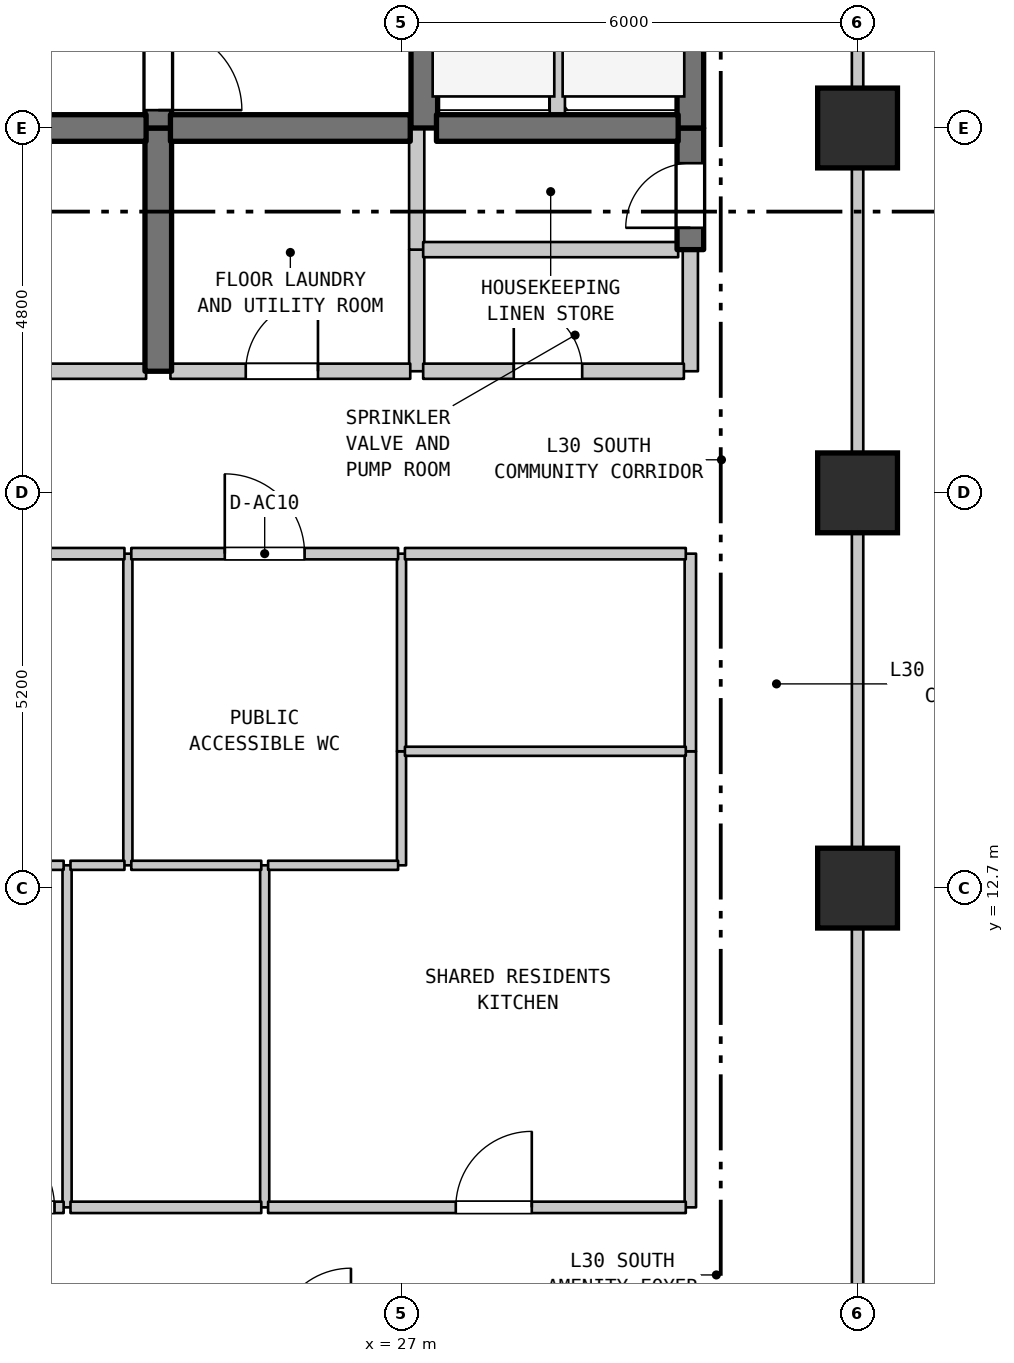
"""IFC4 building model, lengths in metres.
Left out: names, types, materials, properties, quantities, classifications, styles, units other than length and angle.
Written with IfcOpenShell. Run it as: python <this file> out.ifc"""

import sys

from ifc_helpers import new_model, si_unit, direction, frame, frame_2d, origin, origin_2d, place, context, subcontext, project, spatial, rectangle, extrude, element, fill, save


model = new_model("IFC4")
c1 = context("Model", 3, precision=1e-05, world=origin(), true_north=direction((0.0, 1.0)))
c2 = subcontext(c1, "Body", "Model", "MODEL_VIEW")
j1 = project(units=[si_unit("LENGTHUNIT", "METRE"), si_unit("PLANEANGLEUNIT", "RADIAN")], contexts=[c1])
p1 = place(None, origin())
s1 = spatial("IfcSite", under=j1, at=p1, CompositionType="ELEMENT")
p2 = place(p1, origin())
s2 = spatial("IfcBuilding", under=s1, at=p2, CompositionType="ELEMENT")
p3 = place(p2, frame((0.0, 0.0, 125.3)))
s3 = spatial("IfcBuildingStorey", under=s2, at=p3, CompositionType="ELEMENT", Elevation=125.3)
for number, where, z_axis, x_axis in (
    (1, (33.0, 12.7, 0.0), (0.0, 0.0, 1.0), (1.0, 0.0, 0.0)),
    (2, (33.0, 17.9, 0.0), (0.0, 0.0, 1.0), (1.0, 0.0, 0.0)),
    (3, (33.0, 22.7, 0.0), (0.0, 0.0, 1.0), (1.0, 0.0, 0.0)),
):
    element("IfcColumn", number, at=place(p3, frame(where, z_axis=z_axis, x_axis=x_axis)), inside=s3, PredefinedType="COLUMN", context=c2, shape_type="SweptSolid", body=[
        extrude(rectangle(XDim=1.05, YDim=1.05, at=origin_2d()), origin(), (0.0, 0.0, 1.0), 4.5),
    ])
p4 = place(p3, frame((22.6, 8.5, 0.0), z_axis=(0.0, 0.0, 1.0), x_axis=(0.0, 1.0, 0.0)))
e4 = element("IfcWall", 4, at=p4, inside=s3, PredefinedType="PARTITIONING", context=c2, shape_type="SweptSolid", body=[
    extrude(rectangle(XDim=4.5, YDim=0.12, at=frame_2d((2.25, 0.0))), origin(), (0.0, 0.0, 1.0), 4.185),
])
p5 = place(p3, frame((23.4, 13.0, 0.0), z_axis=(0.0, 0.0, 1.0), x_axis=(0.0, 1.0, 0.0)))
e5 = element("IfcWall", 5, at=p5, inside=s3, PredefinedType="PARTITIONING", context=c2, shape_type="SweptSolid", body=[
    extrude(rectangle(XDim=4.1, YDim=0.12, at=frame_2d((2.05, 0.0))), origin(), (0.0, 0.0, 1.0), 4.185),
])
p6 = place(p3, frame((23.8, 19.5, 0.0), z_axis=(0.0, 0.0, 1.0), x_axis=(0.0, 1.0, 0.0)))
e6 = element("IfcWall", 6, at=p6, inside=s3, PredefinedType="SHEAR", context=c2, shape_type="SweptSolid", body=[
    extrude(rectangle(XDim=3.2, YDim=0.35, at=frame_2d((1.6, 0.0))), origin(), (0.0, 0.0, 1.0), 4.185),
])
p7 = place(p3, frame((23.8, 22.7, 0.0), z_axis=(0.0, 0.0, 1.0), x_axis=(0.0, 1.0, 0.0)))
e7 = element("IfcWall", 7, at=p7, inside=s3, PredefinedType="SHEAR", context=c2, shape_type="SweptSolid", body=[
    extrude(rectangle(XDim=5.5, YDim=0.35, at=frame_2d((2.75, 0.0))), origin(), (0.0, 0.0, 1.0), 4.185),
])
p8 = place(p7, frame((0.235, 0.0, 0.0)))
e8 = element("IfcOpeningElement", 8, at=p8, cuts=e7, PredefinedType="OPENING", context=c2, shape_type="SweptSolid", body=[
    extrude(rectangle(XDim=1.1, YDim=2.15, at=frame_2d((0.55, 1.075))), frame((0.0, 0.185, 0.0), z_axis=(0.0, -1.0, 0.0), x_axis=(1.0, 0.0, 0.0)), (0.0, 0.0, 1.0), 0.37),
])
p9 = place(p3, frame((25.2, 8.5, 0.0), z_axis=(0.0, 0.0, 1.0), x_axis=(0.0, 1.0, 0.0)))
e9 = element("IfcWall", 9, at=p9, inside=s3, PredefinedType="PARTITIONING", context=c2, shape_type="SweptSolid", body=[
    extrude(rectangle(XDim=4.5, YDim=0.12, at=frame_2d((2.25, 0.0))), origin(), (0.0, 0.0, 1.0), 4.185),
])
p10 = place(p3, frame((27.0, 13.0, 0.0), z_axis=(0.0, 0.0, 1.0), x_axis=(0.0, 1.0, 0.0)))
e10 = element("IfcWall", 10, at=p10, inside=s3, PredefinedType="PARTITIONING", context=c2, shape_type="SweptSolid", body=[
    extrude(rectangle(XDim=1.5, YDim=0.12, at=frame_2d((0.75, 0.0))), origin(), (0.0, 0.0, 1.0), 4.185),
])
p11 = place(p3, frame((27.0, 14.5, 0.0), z_axis=(0.0, 0.0, 1.0), x_axis=(0.0, 1.0, 0.0)))
e11 = element("IfcWall", 11, at=p11, inside=s3, PredefinedType="PARTITIONING", context=c2, shape_type="SweptSolid", body=[
    extrude(rectangle(XDim=2.6, YDim=0.12, at=frame_2d((1.3, 0.0))), origin(), (0.0, 0.0, 1.0), 4.185),
])
p12 = place(p3, frame((27.2, 19.5, 0.0), z_axis=(0.0, 0.0, 1.0), x_axis=(0.0, 1.0, 0.0)))
e12 = element("IfcWall", 12, at=p12, inside=s3, PredefinedType="STANDARD", context=c2, shape_type="SweptSolid", body=[
    extrude(rectangle(XDim=1.6, YDim=0.2, at=frame_2d((0.8, 0.0))), origin(), (0.0, 0.0, 1.0), 4.185),
])
p13 = place(p3, frame((27.2, 21.1, 0.0), z_axis=(0.0, 0.0, 1.0), x_axis=(0.0, 1.0, 0.0)))
e13 = element("IfcWall", 13, at=p13, inside=s3, PredefinedType="STANDARD", context=c2, shape_type="SweptSolid", body=[
    extrude(rectangle(XDim=1.6, YDim=0.2, at=frame_2d((0.8, 0.0))), origin(), (0.0, 0.0, 1.0), 4.185),
])
p14 = place(p3, frame((27.3, 22.7, 0.0), z_axis=(0.0, 0.0, 1.0), x_axis=(0.0, 1.0, 0.0)))
e14 = element("IfcWall", 14, at=p14, inside=s3, PredefinedType="SHEAR", context=c2, shape_type="SweptSolid", body=[
    extrude(rectangle(XDim=2.9, YDim=0.35, at=frame_2d((1.45, 0.0))), origin(), (0.0, 0.0, 1.0), 4.185),
])
p15 = place(p3, frame((29.05, 22.7, 0.0), z_axis=(0.0, 0.0, 1.0), x_axis=(0.0, 1.0, 0.0)))
e15 = element("IfcWall", 15, at=p15, inside=s3, PredefinedType="STANDARD", context=c2, shape_type="SweptSolid", body=[
    extrude(rectangle(XDim=2.9, YDim=0.2, at=frame_2d((1.45, 0.0))), origin(), (0.0, 0.0, 1.0), 4.185),
])
p16 = place(p3, frame((30.8, 8.5, 0.0), z_axis=(0.0, 0.0, 1.0), x_axis=(0.0, 1.0, 0.0)))
e16 = element("IfcWall", 16, at=p16, inside=s3, PredefinedType="STANDARD", context=c2, shape_type="SweptSolid", body=[
    extrude(rectangle(XDim=6.0, YDim=0.15, at=frame_2d((3.0, 0.0))), origin(), (0.0, 0.0, 1.0), 4.185),
])
p17 = place(p3, frame((30.8, 14.5, 0.0), z_axis=(0.0, 0.0, 1.0), x_axis=(0.0, 1.0, 0.0)))
e17 = element("IfcWall", 17, at=p17, inside=s3, PredefinedType="STANDARD", context=c2, shape_type="SweptSolid", body=[
    extrude(rectangle(XDim=2.6, YDim=0.15, at=frame_2d((1.3, 0.0))), origin(), (0.0, 0.0, 1.0), 4.185),
])
p18 = place(p3, frame((30.8, 19.5, 0.0), z_axis=(0.0, 0.0, 1.0), x_axis=(0.0, 1.0, 0.0)))
e18 = element("IfcWall", 18, at=p18, inside=s3, PredefinedType="STANDARD", context=c2, shape_type="SweptSolid", body=[
    extrude(rectangle(XDim=1.6, YDim=0.2, at=frame_2d((0.8, 0.0))), origin(), (0.0, 0.0, 1.0), 4.185),
])
p19 = place(p3, frame((30.8, 21.1, 0.0), z_axis=(0.0, 0.0, 1.0), x_axis=(0.0, 1.0, 0.0)))
e19 = element("IfcWall", 19, at=p19, inside=s3, PredefinedType="SHEAR", context=c2, shape_type="SweptSolid", body=[
    extrude(rectangle(XDim=1.6, YDim=0.35, at=frame_2d((0.8, 0.0))), origin(), (0.0, 0.0, 1.0), 4.185),
])
p20 = place(p19, frame((0.287, 0.0, 0.0)))
e20 = element("IfcOpeningElement", 20, at=p20, cuts=e19, PredefinedType="OPENING", context=c2, shape_type="SweptSolid", body=[
    extrude(rectangle(XDim=0.85, YDim=2.1, at=frame_2d((0.425, 1.05))), frame((0.0, 0.185, 0.0), z_axis=(0.0, -1.0, 0.0), x_axis=(1.0, 0.0, 0.0)), (0.0, 0.0, 1.0), 0.37),
])
p21 = place(p3, frame((30.8, 22.7, 0.0), z_axis=(0.0, 0.0, 1.0), x_axis=(0.0, 1.0, 0.0)))
e21 = element("IfcWall", 21, at=p21, inside=s3, PredefinedType="SHEAR", context=c2, shape_type="SweptSolid", body=[
    extrude(rectangle(XDim=2.9, YDim=0.35, at=frame_2d((1.45, 0.0))), origin(), (0.0, 0.0, 1.0), 4.185),
])
p22 = place(p3, frame((33.0, 6.7, 0.0), z_axis=(0.0, 0.0, 1.0), x_axis=(0.0, 1.0, 0.0)))
e22 = element("IfcWall", 22, at=p22, inside=s3, PredefinedType="STANDARD", context=c2, shape_type="SweptSolid", body=[
    extrude(rectangle(XDim=19.2, YDim=0.15, at=frame_2d((9.6, 0.0))), origin(), (0.0, 0.0, 1.0), 3.735),
])
p23 = place(p3, frame((18.985, 8.5, 0.0), z_axis=(0.0, 0.0, 1.0), x_axis=(1.0, 0.0, 0.0)))
e23 = element("IfcWall", 23, at=p23, inside=s3, PredefinedType="STANDARD", context=c2, shape_type="SweptSolid", body=[
    extrude(rectangle(XDim=3.57, YDim=0.15, at=frame_2d((1.785, 0.0))), origin(), (0.0, 0.0, 1.0), 4.185),
])
p24 = place(p23, frame((2.45, 0.0, 0.0)))
e24 = element("IfcOpeningElement", 24, at=p24, cuts=e23, PredefinedType="OPENING", context=c2, shape_type="SweptSolid", body=[
    extrude(rectangle(XDim=1.0, YDim=2.15, at=frame_2d((0.5, 1.075))), frame((0.0, 0.085, 0.0), z_axis=(0.0, -1.0, 0.0), x_axis=(1.0, 0.0, 0.0)), (0.0, 0.0, 1.0), 0.17),
])
p25 = place(p3, frame((22.645, 8.5, 0.0), z_axis=(0.0, 0.0, 1.0), x_axis=(1.0, 0.0, 0.0)))
e25 = element("IfcWall", 25, at=p25, inside=s3, PredefinedType="STANDARD", context=c2, shape_type="SweptSolid", body=[
    extrude(rectangle(XDim=2.51, YDim=0.15, at=frame_2d((1.255, 0.0))), origin(), (0.0, 0.0, 1.0), 4.185),
])
p26 = place(p3, frame((25.245, 8.5, 0.0), z_axis=(0.0, 0.0, 1.0), x_axis=(1.0, 0.0, 0.0)))
e26 = element("IfcWall", 26, at=p26, inside=s3, PredefinedType="STANDARD", context=c2, shape_type="SweptSolid", body=[
    extrude(rectangle(XDim=5.495, YDim=0.15, at=frame_2d((2.748, 0.0))), origin(), (0.0, 0.0, 1.0), 4.185),
])
p27 = place(p26, frame((2.469, 0.0, 0.0)))
e27 = element("IfcOpeningElement", 27, at=p27, cuts=e26, PredefinedType="OPENING", context=c2, shape_type="SweptSolid", body=[
    extrude(rectangle(XDim=1.0, YDim=2.15, at=frame_2d((0.5, 1.075))), frame((0.0, 0.085, 0.0), z_axis=(0.0, -1.0, 0.0), x_axis=(1.0, 0.0, 0.0)), (0.0, 0.0, 1.0), 0.17),
])
p28 = place(p3, frame((15.06, 13.0, 0.0), z_axis=(0.0, 0.0, 1.0), x_axis=(1.0, 0.0, 0.0)))
e28 = element("IfcWall", 28, at=p28, inside=s3, PredefinedType="PARTITIONING", context=c2, shape_type="SweptSolid", body=[
    extrude(rectangle(XDim=7.495, YDim=0.12, at=frame_2d((3.748, 0.0))), origin(), (0.0, 0.0, 1.0), 4.185),
])
p29 = place(p3, frame((22.645, 13.0, 0.0), z_axis=(0.0, 0.0, 1.0), x_axis=(1.0, 0.0, 0.0)))
e29 = element("IfcWall", 29, at=p29, inside=s3, PredefinedType="PARTITIONING", context=c2, shape_type="SweptSolid", body=[
    extrude(rectangle(XDim=0.71, YDim=0.12, at=frame_2d((0.355, 0.0))), origin(), (0.0, 0.0, 1.0), 4.185),
])
for number, where, z_axis, x_axis in (
    (30, (23.445, 13.0, 0.0), (0.0, 0.0, 1.0), (1.0, 0.0, 0.0)),
    (31, (25.245, 13.0, 0.0), (0.0, 0.0, 1.0), (1.0, 0.0, 0.0)),
):
    element("IfcWall", number, at=place(p3, frame(where, z_axis=z_axis, x_axis=x_axis)), inside=s3, PredefinedType="PARTITIONING", context=c2, shape_type="SweptSolid", body=[
        extrude(rectangle(XDim=1.71, YDim=0.12, at=frame_2d((0.855, 0.0))), origin(), (0.0, 0.0, 1.0), 4.185),
    ])
p30 = place(p3, frame((27.045, 14.5, 0.0), z_axis=(0.0, 0.0, 1.0), x_axis=(1.0, 0.0, 0.0)))
e32 = element("IfcWall", 32, at=p30, inside=s3, PredefinedType="PARTITIONING", context=c2, shape_type="SweptSolid", body=[
    extrude(rectangle(XDim=3.695, YDim=0.12, at=frame_2d((1.848, 0.0))), origin(), (0.0, 0.0, 1.0), 4.185),
])
p31 = place(p3, frame((15.06, 17.1, 0.0), z_axis=(0.0, 0.0, 1.0), x_axis=(1.0, 0.0, 0.0)))
e33 = element("IfcWall", 33, at=p31, inside=s3, PredefinedType="STANDARD", context=c2, shape_type="SweptSolid", body=[
    extrude(rectangle(XDim=8.295, YDim=0.15, at=frame_2d((4.147, 0.0))), origin(), (0.0, 0.0, 1.0), 4.185),
])
p32 = place(p31, frame((1.595, 0.0, 0.0)))
e34 = element("IfcOpeningElement", 34, at=p32, cuts=e33, PredefinedType="OPENING", context=c2, shape_type="SweptSolid", body=[
    extrude(rectangle(XDim=0.9, YDim=2.1, at=frame_2d((0.45, 1.05))), frame((0.0, 0.085, 0.0), z_axis=(0.0, -1.0, 0.0), x_axis=(1.0, 0.0, 0.0)), (0.0, 0.0, 1.0), 0.17),
])
p33 = place(p31, frame((5.645, 0.0, 0.0)))
e35 = element("IfcOpeningElement", 35, at=p33, cuts=e33, PredefinedType="OPENING", context=c2, shape_type="SweptSolid", body=[
    extrude(rectangle(XDim=0.9, YDim=2.1, at=frame_2d((0.45, 1.05))), frame((0.0, 0.085, 0.0), z_axis=(0.0, -1.0, 0.0), x_axis=(1.0, 0.0, 0.0)), (0.0, 0.0, 1.0), 0.17),
])
p34 = place(p3, frame((23.445, 17.1, 0.0), z_axis=(0.0, 0.0, 1.0), x_axis=(1.0, 0.0, 0.0)))
e36 = element("IfcWall", 36, at=p34, inside=s3, PredefinedType="STANDARD", context=c2, shape_type="SweptSolid", body=[
    extrude(rectangle(XDim=3.51, YDim=0.15, at=frame_2d((1.755, 0.0))), origin(), (0.0, 0.0, 1.0), 4.185),
])
p35 = place(p34, frame((1.23, 0.0, 0.0)))
e37 = element("IfcOpeningElement", 37, at=p35, cuts=e36, PredefinedType="OPENING", context=c2, shape_type="SweptSolid", body=[
    extrude(rectangle(XDim=1.05, YDim=2.15, at=frame_2d((0.525, 1.075))), frame((0.0, 0.085, 0.0), z_axis=(0.0, -1.0, 0.0), x_axis=(1.0, 0.0, 0.0)), (0.0, 0.0, 1.0), 0.17),
])
p36 = place(p3, frame((27.045, 17.1, 0.0), z_axis=(0.0, 0.0, 1.0), x_axis=(1.0, 0.0, 0.0)))
e38 = element("IfcWall", 38, at=p36, inside=s3, PredefinedType="STANDARD", context=c2, shape_type="SweptSolid", body=[
    extrude(rectangle(XDim=3.695, YDim=0.15, at=frame_2d((1.848, 0.0))), origin(), (0.0, 0.0, 1.0), 4.185),
])
p37 = place(p3, frame((19.16, 19.5, 0.0), z_axis=(0.0, 0.0, 1.0), x_axis=(1.0, 0.0, 0.0)))
e39 = element("IfcWall", 39, at=p37, inside=s3, PredefinedType="STANDARD", context=c2, shape_type="SweptSolid", body=[
    extrude(rectangle(XDim=4.48, YDim=0.2, at=frame_2d((2.24, 0.0))), origin(), (0.0, 0.0, 1.0), 4.185),
])
p38 = place(p37, frame((1.64, 0.0, 0.0)))
e40 = element("IfcOpeningElement", 40, at=p38, cuts=e39, PredefinedType="OPENING", context=c2, shape_type="SweptSolid", body=[
    extrude(rectangle(XDim=1.2, YDim=2.2, at=frame_2d((0.6, 1.1))), frame((0.0, 0.11, 0.0), z_axis=(0.0, -1.0, 0.0), x_axis=(1.0, 0.0, 0.0)), (0.0, 0.0, 1.0), 0.22),
])
p39 = place(p3, frame((23.96, 19.5, 0.0), z_axis=(0.0, 0.0, 1.0), x_axis=(1.0, 0.0, 0.0)))
e41 = element("IfcWall", 41, at=p39, inside=s3, PredefinedType="STANDARD", context=c2, shape_type="SweptSolid", body=[
    extrude(rectangle(XDim=3.155, YDim=0.2, at=frame_2d((1.578, 0.0))), origin(), (0.0, 0.0, 1.0), 4.185),
])
p40 = place(p39, frame((0.991, 0.0, 0.0)))
e42 = element("IfcOpeningElement", 42, at=p40, cuts=e41, PredefinedType="OPENING", context=c2, shape_type="SweptSolid", body=[
    extrude(rectangle(XDim=0.95, YDim=2.15, at=frame_2d((0.475, 1.075))), frame((0.0, 0.11, 0.0), z_axis=(0.0, -1.0, 0.0), x_axis=(1.0, 0.0, 0.0)), (0.0, 0.0, 1.0), 0.22),
])
p41 = place(p3, frame((27.285, 19.5, 0.0), z_axis=(0.0, 0.0, 1.0), x_axis=(1.0, 0.0, 0.0)))
e43 = element("IfcWall", 43, at=p41, inside=s3, PredefinedType="STANDARD", context=c2, shape_type="SweptSolid", body=[
    extrude(rectangle(XDim=3.43, YDim=0.2, at=frame_2d((1.715, 0.0))), origin(), (0.0, 0.0, 1.0), 4.185),
])
p42 = place(p41, frame((1.192, 0.0, 0.0)))
e44 = element("IfcOpeningElement", 44, at=p42, cuts=e43, PredefinedType="OPENING", context=c2, shape_type="SweptSolid", body=[
    extrude(rectangle(XDim=0.9, YDim=2.15, at=frame_2d((0.45, 1.075))), frame((0.0, 0.11, 0.0), z_axis=(0.0, -1.0, 0.0), x_axis=(1.0, 0.0, 0.0)), (0.0, 0.0, 1.0), 0.22),
])
p43 = place(p3, frame((27.285, 21.1, 0.0), z_axis=(0.0, 0.0, 1.0), x_axis=(1.0, 0.0, 0.0)))
e45 = element("IfcWall", 45, at=p43, inside=s3, PredefinedType="STANDARD", context=c2, shape_type="SweptSolid", body=[
    extrude(rectangle(XDim=3.355, YDim=0.2, at=frame_2d((1.677, 0.0))), origin(), (0.0, 0.0, 1.0), 4.185),
])
p44 = place(p3, frame((19.16, 22.7, 0.0), z_axis=(0.0, 0.0, 1.0), x_axis=(1.0, 0.0, 0.0)))
e46 = element("IfcWall", 46, at=p44, inside=s3, PredefinedType="SHEAR", context=c2, shape_type="SweptSolid", body=[
    extrude(rectangle(XDim=4.48, YDim=0.35, at=frame_2d((2.24, 0.0))), origin(), (0.0, 0.0, 1.0), 4.185),
])
p45 = place(p44, frame((1.64, 0.0, 0.0)))
e47 = element("IfcOpeningElement", 47, at=p45, cuts=e46, PredefinedType="OPENING", context=c2, shape_type="SweptSolid", body=[
    extrude(rectangle(XDim=1.2, YDim=2.2, at=frame_2d((0.6, 1.1))), frame((0.0, 0.185, 0.0), z_axis=(0.0, -1.0, 0.0), x_axis=(1.0, 0.0, 0.0)), (0.0, 0.0, 1.0), 0.37),
])
p46 = place(p3, frame((23.96, 22.7, 0.0), z_axis=(0.0, 0.0, 1.0), x_axis=(1.0, 0.0, 0.0)))
e48 = element("IfcWall", 48, at=p46, inside=s3, PredefinedType="SHEAR", context=c2, shape_type="SweptSolid", body=[
    extrude(rectangle(XDim=3.155, YDim=0.35, at=frame_2d((1.578, 0.0))), origin(), (0.0, 0.0, 1.0), 4.185),
])
p47 = place(p3, frame((27.46, 22.7, 0.0), z_axis=(0.0, 0.0, 1.0), x_axis=(1.0, 0.0, 0.0)))
e49 = element("IfcWall", 49, at=p47, inside=s3, PredefinedType="SHEAR", context=c2, shape_type="SweptSolid", body=[
    extrude(rectangle(XDim=3.18, YDim=0.35, at=frame_2d((1.59, 0.0))), origin(), (0.0, 0.0, 1.0), 4.185),
])
p48 = place(p8, frame((1.1, 0.0, 0.0), z_axis=(0.0, 0.0, 1.0), x_axis=(-1.0, 0.0, 0.0)))
e50 = element("IfcDoor", 50, at=p48, inside=s3, OperationType="SINGLE_SWING_LEFT", PredefinedType="DOOR", context=c2, shape_type="SweptSolid", body=[
    extrude(rectangle(XDim=1.1, YDim=2.15, at=frame_2d((0.55, 1.075))), frame((0.0, 0.025, 0.0), z_axis=(0.0, -1.0, 0.0), x_axis=(1.0, 0.0, 0.0)), (0.0, 0.0, 1.0), 0.05),
])
fill(e8, e50)
p49 = place(p20, origin())
e51 = element("IfcDoor", 51, at=p49, inside=s3, OperationType="SINGLE_SWING_LEFT", PredefinedType="DOOR", context=c2, shape_type="SweptSolid", body=[
    extrude(rectangle(XDim=0.85, YDim=2.1, at=frame_2d((0.425, 1.05))), frame((0.0, 0.025, 0.0), z_axis=(0.0, -1.0, 0.0), x_axis=(1.0, 0.0, 0.0)), (0.0, 0.0, 1.0), 0.05),
])
fill(e20, e51)
p50 = place(p24, origin())
e52 = element("IfcDoor", 52, at=p50, inside=s3, OperationType="SINGLE_SWING_LEFT", PredefinedType="DOOR", context=c2, shape_type="SweptSolid", body=[
    extrude(rectangle(XDim=1.0, YDim=2.15, at=frame_2d((0.5, 1.075))), frame((0.0, 0.025, 0.0), z_axis=(0.0, -1.0, 0.0), x_axis=(1.0, 0.0, 0.0)), (0.0, 0.0, 1.0), 0.05),
])
fill(e24, e52)
p51 = place(p27, origin())
e53 = element("IfcDoor", 53, at=p51, inside=s3, OperationType="SINGLE_SWING_RIGHT", PredefinedType="DOOR", context=c2, shape_type="SweptSolid", body=[
    extrude(rectangle(XDim=1.0, YDim=2.15, at=frame_2d((0.5, 1.075))), frame((0.0, 0.025, 0.0), z_axis=(0.0, -1.0, 0.0), x_axis=(1.0, 0.0, 0.0)), (0.0, 0.0, 1.0), 0.05),
])
fill(e27, e53)
p52 = place(p35, origin())
e54 = element("IfcDoor", 54, at=p52, inside=s3, OperationType="SINGLE_SWING_LEFT", PredefinedType="DOOR", context=c2, shape_type="SweptSolid", body=[
    extrude(rectangle(XDim=1.05, YDim=2.15, at=frame_2d((0.525, 1.075))), frame((0.0, 0.025, 0.0), z_axis=(0.0, -1.0, 0.0), x_axis=(1.0, 0.0, 0.0)), (0.0, 0.0, 1.0), 0.05),
])
fill(e37, e54)
p53 = place(p40, origin())
e55 = element("IfcDoor", 55, at=p53, inside=s3, OperationType="SINGLE_SWING_RIGHT", PredefinedType="DOOR", context=c2, shape_type="SweptSolid", body=[
    extrude(rectangle(XDim=0.95, YDim=2.15, at=frame_2d((0.475, 1.075))), frame((0.0, 0.025, 0.0), z_axis=(0.0, -1.0, 0.0), x_axis=(1.0, 0.0, 0.0)), (0.0, 0.0, 1.0), 0.05),
])
fill(e42, e55)
p54 = place(p42, origin())
e56 = element("IfcDoor", 56, at=p54, inside=s3, OperationType="SINGLE_SWING_LEFT", PredefinedType="DOOR", context=c2, shape_type="SweptSolid", body=[
    extrude(rectangle(XDim=0.9, YDim=2.15, at=frame_2d((0.45, 1.075))), frame((0.0, 0.025, 0.0), z_axis=(0.0, -1.0, 0.0), x_axis=(1.0, 0.0, 0.0)), (0.0, 0.0, 1.0), 0.05),
])
fill(e44, e56)
save(model, sys.argv[1])
